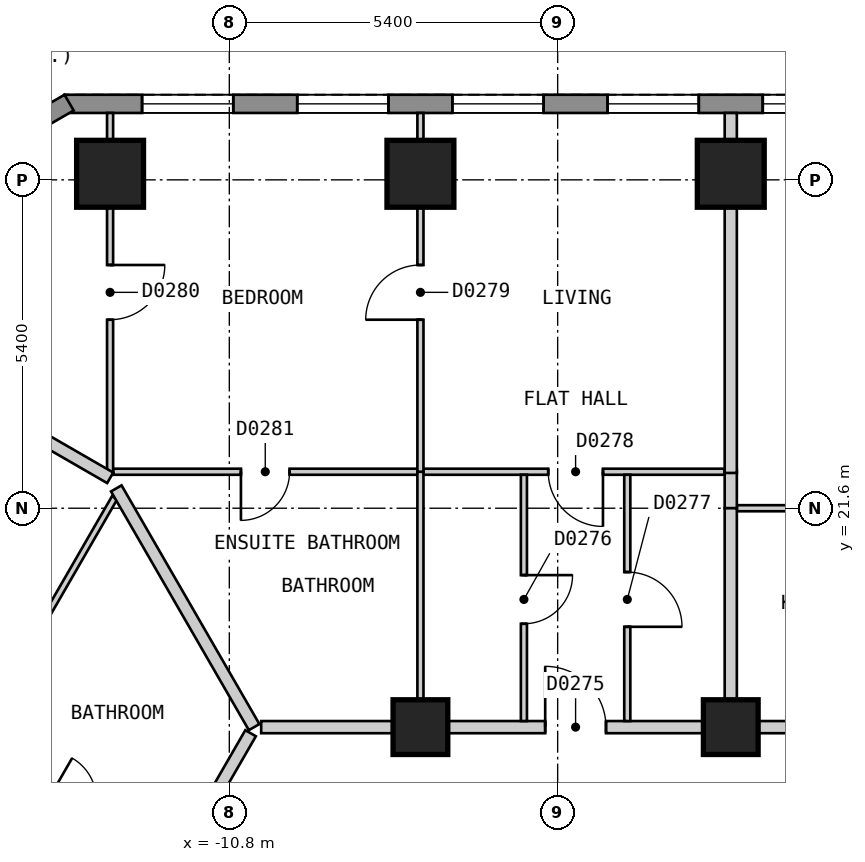
"""IFC4 building model, lengths in metres.
Left out: names, types, materials, properties, quantities, classifications, styles, units other than length and angle.
Written with IfcOpenShell. Run it as: python <this file> out.ifc"""

import sys

from ifc_helpers import new_model, si_unit, direction, frame, frame_2d, origin, origin_2d, place, context, subcontext, project, spatial, polyline, rectangle, outline, extrude, element, fill, save


model = new_model("IFC4")
c1 = context("Model", 3, precision=1e-05, world=origin(), true_north=direction((0.0, 1.0)))
c2 = subcontext(c1, "Body", "Model", "MODEL_VIEW")
j1 = project(units=[si_unit("LENGTHUNIT", "METRE"), si_unit("PLANEANGLEUNIT", "RADIAN")], contexts=[c1])
p1 = place(None, origin())
s1 = spatial("IfcSite", under=j1, at=p1, CompositionType="ELEMENT")
p2 = place(p1, origin())
s2 = spatial("IfcBuilding", under=s1, at=p2, CompositionType="ELEMENT")
p3 = place(p2, frame((0.0, 0.0, 41.4)))
s3 = spatial("IfcBuildingStorey", under=s2, at=p3, CompositionType="ELEMENT", Elevation=41.4)
for number, where, z_axis, x_axis in (
    (1, (-2.553, 27.1, 0.0), (0.0, 0.0, 1.0), (-1.0, 0.0, 0.0)),
    (2, (-7.657, 27.1, 0.0), (0.0, 0.0, 1.0), (-1.0, 0.0, 0.0)),
    (3, (-12.761, 27.1, 0.0), (0.0, 0.0, 1.0), (-1.0, 0.0, 0.0)),
):
    element("IfcColumn", number, at=place(p3, frame(where, z_axis=z_axis, x_axis=x_axis)), inside=s3, PredefinedType="COLUMN", context=c2, shape_type="SweptSolid", body=[
        extrude(rectangle(XDim=1.1, YDim=1.1, at=origin_2d()), origin(), (0.0, 0.0, 1.0), 3.0),
    ])
for number, where, z_axis, x_axis in (
    (4, (-2.553, 18.0, 0.0), (0.0, 0.0, 1.0), (-1.0, 0.0, 0.0)),
    (5, (-7.657, 18.0, 0.0), (0.0, 0.0, 1.0), (-1.0, 0.0, 0.0)),
):
    element("IfcColumn", number, at=place(p3, frame(where, z_axis=z_axis, x_axis=x_axis)), inside=s3, PredefinedType="COLUMN", context=c2, shape_type="SweptSolid", body=[
        extrude(rectangle(XDim=0.9, YDim=0.9, at=origin_2d()), origin(), (0.0, 0.0, 1.0), 3.0),
    ])
p4 = place(p3, frame((13.51, 28.25, 0.0), z_axis=(0.0, 0.0, 1.0), x_axis=(-1.0, 0.0, 0.0)))
e6 = element("IfcWall", 6, at=p4, inside=s3, PredefinedType="SOLIDWALL", context=c2, shape_type="SweptSolid", body=[
    extrude(outline(polyline([(0.0, -0.15), (27.02, -0.15), (26.94, 0.15), (0.08, 0.15), (0.0, -0.15)])), origin(), (0.0, 0.0, 1.0), 2.7),
])
p5 = place(p4, frame((1.277, 0.0, 0.15)))
e7 = element("IfcOpeningElement", 7, at=p5, cuts=e6, PredefinedType="OPENING", context=c2, shape_type="SweptSolid", body=[
    extrude(rectangle(XDim=1.5, YDim=2.1, at=frame_2d((0.75, 1.05))), frame((0.0, 0.16, 0.0), z_axis=(0.0, -1.0, 0.0), x_axis=(1.0, 0.0, 0.0)), (0.0, 0.0, 1.0), 0.32),
])
p6 = place(p4, frame((3.829, 0.0, 0.15)))
e8 = element("IfcOpeningElement", 8, at=p6, cuts=e6, PredefinedType="OPENING", context=c2, shape_type="SweptSolid", body=[
    extrude(rectangle(XDim=1.5, YDim=2.1, at=frame_2d((0.75, 1.05))), frame((0.0, 0.16, 0.0), z_axis=(0.0, -1.0, 0.0), x_axis=(1.0, 0.0, 0.0)), (0.0, 0.0, 1.0), 0.32),
])
p7 = place(p4, frame((6.381, 0.0, 0.15)))
e9 = element("IfcOpeningElement", 9, at=p7, cuts=e6, PredefinedType="OPENING", context=c2, shape_type="SweptSolid", body=[
    extrude(rectangle(XDim=1.5, YDim=2.1, at=frame_2d((0.75, 1.05))), frame((0.0, 0.16, 0.0), z_axis=(0.0, -1.0, 0.0), x_axis=(1.0, 0.0, 0.0)), (0.0, 0.0, 1.0), 0.32),
])
p8 = place(p4, frame((8.933, 0.0, 0.15)))
e10 = element("IfcOpeningElement", 10, at=p8, cuts=e6, PredefinedType="OPENING", context=c2, shape_type="SweptSolid", body=[
    extrude(rectangle(XDim=1.5, YDim=2.1, at=frame_2d((0.75, 1.05))), frame((0.0, 0.16, 0.0), z_axis=(0.0, -1.0, 0.0), x_axis=(1.0, 0.0, 0.0)), (0.0, 0.0, 1.0), 0.32),
])
p9 = place(p4, frame((11.485, 0.0, 0.15)))
e11 = element("IfcOpeningElement", 11, at=p9, cuts=e6, PredefinedType="OPENING", context=c2, shape_type="SweptSolid", body=[
    extrude(rectangle(XDim=1.5, YDim=2.1, at=frame_2d((0.75, 1.05))), frame((0.0, 0.16, 0.0), z_axis=(0.0, -1.0, 0.0), x_axis=(1.0, 0.0, 0.0)), (0.0, 0.0, 1.0), 0.32),
])
p10 = place(p4, frame((14.037, 0.0, 0.15)))
e12 = element("IfcOpeningElement", 12, at=p10, cuts=e6, PredefinedType="OPENING", context=c2, shape_type="SweptSolid", body=[
    extrude(rectangle(XDim=1.5, YDim=2.1, at=frame_2d((0.75, 1.05))), frame((0.0, 0.16, 0.0), z_axis=(0.0, -1.0, 0.0), x_axis=(1.0, 0.0, 0.0)), (0.0, 0.0, 1.0), 0.32),
])
p11 = place(p4, frame((16.589, 0.0, 0.15)))
e13 = element("IfcOpeningElement", 13, at=p11, cuts=e6, PredefinedType="OPENING", context=c2, shape_type="SweptSolid", body=[
    extrude(rectangle(XDim=1.5, YDim=2.1, at=frame_2d((0.75, 1.05))), frame((0.0, 0.16, 0.0), z_axis=(0.0, -1.0, 0.0), x_axis=(1.0, 0.0, 0.0)), (0.0, 0.0, 1.0), 0.32),
])
p12 = place(p4, frame((19.141, 0.0, 0.15)))
e14 = element("IfcOpeningElement", 14, at=p12, cuts=e6, PredefinedType="OPENING", context=c2, shape_type="SweptSolid", body=[
    extrude(rectangle(XDim=1.5, YDim=2.1, at=frame_2d((0.75, 1.05))), frame((0.0, 0.16, 0.0), z_axis=(0.0, -1.0, 0.0), x_axis=(1.0, 0.0, 0.0)), (0.0, 0.0, 1.0), 0.32),
])
p13 = place(p4, frame((21.693, 0.0, 0.15)))
e15 = element("IfcOpeningElement", 15, at=p13, cuts=e6, PredefinedType="OPENING", context=c2, shape_type="SweptSolid", body=[
    extrude(rectangle(XDim=1.5, YDim=2.1, at=frame_2d((0.75, 1.05))), frame((0.0, 0.16, 0.0), z_axis=(0.0, -1.0, 0.0), x_axis=(1.0, 0.0, 0.0)), (0.0, 0.0, 1.0), 0.32),
])
p14 = place(p4, frame((24.245, 0.0, 0.15)))
e16 = element("IfcOpeningElement", 16, at=p14, cuts=e6, PredefinedType="OPENING", context=c2, shape_type="SweptSolid", body=[
    extrude(rectangle(XDim=1.5, YDim=2.1, at=frame_2d((0.75, 1.05))), frame((0.0, 0.16, 0.0), z_axis=(0.0, -1.0, 0.0), x_axis=(1.0, 0.0, 0.0)), (0.0, 0.0, 1.0), 0.32),
])
p15 = place(p3, frame((-13.435, 28.27, 0.0), z_axis=(0.0, 0.0, 1.0), x_axis=(-0.866010750942, -0.50002537861, 0.0)))
e17 = element("IfcWall", 17, at=p15, inside=s3, PredefinedType="SOLIDWALL", context=c2, shape_type="SweptSolid", body=[
    extrude(outline(polyline([(0.0, -0.15), (5.0, -0.15), (4.919, 0.15), (0.08, 0.15), (0.0, -0.15)])), origin(), (0.0, 0.0, 1.0), 2.7),
])
p16 = place(p15, frame((0.65, 0.0, 0.15)))
e18 = element("IfcOpeningElement", 18, at=p16, cuts=e17, PredefinedType="OPENING", context=c2, shape_type="SweptSolid", body=[
    extrude(rectangle(XDim=1.2, YDim=2.1, at=frame_2d((0.6, 1.05))), frame((0.0, 0.16, 0.0), z_axis=(0.0, -1.0, 0.0), x_axis=(1.0, 0.0, 0.0)), (0.0, 0.0, 1.0), 0.32),
])
p17 = place(p15, frame((3.149, 0.0, 0.15)))
e19 = element("IfcOpeningElement", 19, at=p17, cuts=e17, PredefinedType="OPENING", context=c2, shape_type="SweptSolid", body=[
    extrude(rectangle(XDim=1.2, YDim=2.1, at=frame_2d((0.6, 1.05))), frame((0.0, 0.16, 0.0), z_axis=(0.0, -1.0, 0.0), x_axis=(1.0, 0.0, 0.0)), (0.0, 0.0, 1.0), 0.32),
])
p18 = place(p3, frame((-10.276, 18.0, 0.0), z_axis=(0.0, 0.0, 1.0), x_axis=(1.0, 0.0, 0.0)))
e20 = element("IfcWall", 20, at=p18, inside=s3, PredefinedType="PARTITIONING", context=c2, shape_type="SweptSolid", body=[
    extrude(rectangle(XDim=20.558, YDim=0.2, at=frame_2d((10.279, 0.0))), origin(), (0.0, 0.0, 1.0), 2.7),
])
p19 = place(p18, frame((19.265, 0.0, 0.0)))
e21 = element("IfcOpeningElement", 21, at=p19, cuts=e20, PredefinedType="OPENING", context=c2, shape_type="SweptSolid", body=[
    extrude(rectangle(XDim=1.0, YDim=2.1, at=frame_2d((0.5, 1.05))), frame((0.0, 0.11, 0.0), z_axis=(0.0, -1.0, 0.0), x_axis=(1.0, 0.0, 0.0)), (0.0, 0.0, 1.0), 0.22),
])
p20 = place(p18, frame((14.879, 0.0, 0.0)))
e22 = element("IfcOpeningElement", 22, at=p20, cuts=e20, PredefinedType="OPENING", context=c2, shape_type="SweptSolid", body=[
    extrude(rectangle(XDim=1.0, YDim=2.1, at=frame_2d((0.5, 1.05))), frame((0.0, 0.11, 0.0), z_axis=(0.0, -1.0, 0.0), x_axis=(1.0, 0.0, 0.0)), (0.0, 0.0, 1.0), 0.22),
])
p21 = place(p18, frame((4.671, 0.0, 0.0)))
e23 = element("IfcOpeningElement", 23, at=p21, cuts=e20, PredefinedType="OPENING", context=c2, shape_type="SweptSolid", body=[
    extrude(rectangle(XDim=1.0, YDim=2.1, at=frame_2d((0.5, 1.05))), frame((0.0, 0.11, 0.0), z_axis=(0.0, -1.0, 0.0), x_axis=(1.0, 0.0, 0.0)), (0.0, 0.0, 1.0), 0.22),
])
p22 = place(p3, frame((-20.727, 0.099, 0.0), z_axis=(0.0, 0.0, 1.0), x_axis=(0.499993204491, 0.866029327138, 0.0)))
e24 = element("IfcWall", 24, at=p22, inside=s3, PredefinedType="PARTITIONING", context=c2, shape_type="SweptSolid", body=[
    extrude(rectangle(XDim=20.554, YDim=0.2, at=frame_2d((10.277, 0.0))), origin(), (0.0, 0.0, 1.0), 2.7),
])
p23 = place(p22, frame((14.88, 0.0, 0.0)))
e25 = element("IfcOpeningElement", 25, at=p23, cuts=e24, PredefinedType="OPENING", context=c2, shape_type="SweptSolid", body=[
    extrude(rectangle(XDim=1.0, YDim=2.1, at=frame_2d((0.5, 1.05))), frame((0.0, 0.11, 0.0), z_axis=(0.0, -1.0, 0.0), x_axis=(1.0, 0.0, 0.0)), (0.0, 0.0, 1.0), 0.22),
])
p24 = place(p22, frame((4.673, 0.0, 0.0)))
e26 = element("IfcOpeningElement", 26, at=p24, cuts=e24, PredefinedType="OPENING", context=c2, shape_type="SweptSolid", body=[
    extrude(rectangle(XDim=1.0, YDim=2.1, at=frame_2d((0.5, 1.05))), frame((0.0, 0.11, 0.0), z_axis=(0.0, -1.0, 0.0), x_axis=(1.0, 0.0, 0.0)), (0.0, 0.0, 1.0), 0.22),
])
p25 = place(p22, frame((0.838, 0.0, 0.0)))
e27 = element("IfcOpeningElement", 27, at=p25, cuts=e24, PredefinedType="OPENING", context=c2, shape_type="SweptSolid", body=[
    extrude(rectangle(XDim=0.8, YDim=2.1, at=frame_2d((0.4, 1.05))), frame((0.0, 0.11, 0.0), z_axis=(0.0, -1.0, 0.0), x_axis=(1.0, 0.0, 0.0)), (0.0, 0.0, 1.0), 0.22),
])
p26 = place(p3, frame((-2.453, 21.6, 0.0), z_axis=(0.0, 0.0, 1.0), x_axis=(1.0, 0.0, 0.0)))
e28 = element("IfcWall", 28, at=p26, inside=s3, PredefinedType="PARTITIONING", context=c2, shape_type="SweptSolid", body=[
    extrude(rectangle(XDim=4.954, YDim=0.1, at=frame_2d((2.477, 0.0))), origin(), (0.0, 0.0, 1.0), 2.7),
])
p27 = place(p26, frame((2.052, 0.0, 0.0)))
e29 = element("IfcOpeningElement", 29, at=p27, cuts=e28, PredefinedType="OPENING", context=c2, shape_type="SweptSolid", body=[
    extrude(rectangle(XDim=0.8, YDim=2.1, at=frame_2d((0.4, 1.05))), frame((0.0, 0.06, 0.0), z_axis=(0.0, -1.0, 0.0), x_axis=(1.0, 0.0, 0.0)), (0.0, 0.0, 1.0), 0.12),
])
p28 = place(p3, frame((-12.711, 22.2, 0.0), z_axis=(0.0, 0.0, 1.0), x_axis=(1.0, 0.0, 0.0)))
e30 = element("IfcWall", 30, at=p28, inside=s3, PredefinedType="PARTITIONING", context=c2, shape_type="SweptSolid", body=[
    extrude(rectangle(XDim=10.058, YDim=0.1, at=frame_2d((5.029, 0.0))), origin(), (0.0, 0.0, 1.0), 2.7),
])
p29 = place(p28, frame((7.156, 0.0, 0.0)))
e31 = element("IfcOpeningElement", 31, at=p29, cuts=e30, PredefinedType="OPENING", context=c2, shape_type="SweptSolid", body=[
    extrude(rectangle(XDim=0.9, YDim=2.1, at=frame_2d((0.45, 1.05))), frame((0.0, 0.06, 0.0), z_axis=(0.0, -1.0, 0.0), x_axis=(1.0, 0.0, 0.0)), (0.0, 0.0, 1.0), 0.12),
])
p30 = place(p28, frame((2.102, 0.0, 0.0)))
e32 = element("IfcOpeningElement", 32, at=p30, cuts=e30, PredefinedType="OPENING", context=c2, shape_type="SweptSolid", body=[
    extrude(rectangle(XDim=0.8, YDim=2.1, at=frame_2d((0.4, 1.05))), frame((0.0, 0.06, 0.0), z_axis=(0.0, -1.0, 0.0), x_axis=(1.0, 0.0, 0.0)), (0.0, 0.0, 1.0), 0.12),
])
p31 = place(p3, frame((-20.169, 8.812, 0.0), z_axis=(0.0, 0.0, 1.0), x_axis=(0.499995459772, 0.86602802507, 0.0)))
e33 = element("IfcWall", 33, at=p31, inside=s3, PredefinedType="PARTITIONING", context=c2, shape_type="SweptSolid", body=[
    extrude(rectangle(XDim=14.966, YDim=0.1, at=frame_2d((7.483, 0.0))), origin(), (0.0, 0.0, 1.0), 2.7),
])
p32 = place(p31, frame((7.105, 0.0, 0.0)))
e34 = element("IfcOpeningElement", 34, at=p32, cuts=e33, PredefinedType="OPENING", context=c2, shape_type="SweptSolid", body=[
    extrude(rectangle(XDim=0.9, YDim=2.1, at=frame_2d((0.45, 1.05))), frame((0.0, 0.06, 0.0), z_axis=(0.0, -1.0, 0.0), x_axis=(1.0, 0.0, 0.0)), (0.0, 0.0, 1.0), 0.12),
])
p33 = place(p3, frame((-4.255, 18.1, 0.0), z_axis=(0.0, 0.0, 1.0), x_axis=(0.0, 1.0, 0.0)))
e35 = element("IfcWall", 35, at=p33, inside=s3, PredefinedType="PARTITIONING", context=c2, shape_type="SweptSolid", body=[
    extrude(rectangle(XDim=4.05, YDim=0.1, at=frame_2d((2.025, 0.0))), origin(), (0.0, 0.0, 1.0), 2.7),
])
p34 = place(p33, frame((1.55, 0.0, 0.0)))
e36 = element("IfcOpeningElement", 36, at=p34, cuts=e35, PredefinedType="OPENING", context=c2, shape_type="SweptSolid", body=[
    extrude(rectangle(XDim=0.9, YDim=2.1, at=frame_2d((0.45, 1.05))), frame((0.0, 0.06, 0.0), z_axis=(0.0, -1.0, 0.0), x_axis=(1.0, 0.0, 0.0)), (0.0, 0.0, 1.0), 0.12),
])
p35 = place(p3, frame((-5.955, 18.1, 0.0), z_axis=(0.0, 0.0, 1.0), x_axis=(0.0, 1.0, 0.0)))
e37 = element("IfcWall", 37, at=p35, inside=s3, PredefinedType="PARTITIONING", context=c2, shape_type="SweptSolid", body=[
    extrude(rectangle(XDim=4.05, YDim=0.1, at=frame_2d((2.025, 0.0))), origin(), (0.0, 0.0, 1.0), 2.7),
])
p36 = place(p35, frame((1.6, 0.0, 0.0)))
e38 = element("IfcOpeningElement", 38, at=p36, cuts=e37, PredefinedType="OPENING", context=c2, shape_type="SweptSolid", body=[
    extrude(rectangle(XDim=0.8, YDim=2.1, at=frame_2d((0.4, 1.05))), frame((0.0, 0.06, 0.0), z_axis=(0.0, -1.0, 0.0), x_axis=(1.0, 0.0, 0.0)), (0.0, 0.0, 1.0), 0.12),
])
p37 = place(p3, frame((-7.657, 18.1, 0.0), z_axis=(0.0, 0.0, 1.0), x_axis=(0.0, 1.0, 0.0)))
e39 = element("IfcWall", 39, at=p37, inside=s3, PredefinedType="PARTITIONING", context=c2, shape_type="SweptSolid", body=[
    extrude(rectangle(XDim=4.1, YDim=0.1, at=frame_2d((2.05, 0.0))), origin(), (0.0, 0.0, 1.0), 2.7),
])
p38 = place(p3, frame((-12.761, 22.2, 0.0), z_axis=(0.0, 0.0, 1.0), x_axis=(0.0, 1.0, 0.0)))
e40 = element("IfcWall", 40, at=p38, inside=s3, PredefinedType="PARTITIONING", context=c2, shape_type="SweptSolid", body=[
    extrude(rectangle(XDim=5.9, YDim=0.1, at=frame_2d((2.95, 0.0))), origin(), (0.0, 0.0, 1.0), 2.7),
])
p39 = place(p38, frame((2.5, 0.0, 0.0)))
e41 = element("IfcOpeningElement", 41, at=p39, cuts=e40, PredefinedType="OPENING", context=c2, shape_type="SweptSolid", body=[
    extrude(rectangle(XDim=0.9, YDim=2.1, at=frame_2d((0.45, 1.05))), frame((0.0, 0.06, 0.0), z_axis=(0.0, -1.0, 0.0), x_axis=(1.0, 0.0, 0.0)), (0.0, 0.0, 1.0), 0.12),
])
p40 = place(p3, frame((-12.659, 21.926, 0.0), z_axis=(0.0, 0.0, 1.0), x_axis=(0.500025458316, -0.86601070492, 0.0)))
e42 = element("IfcWall", 42, at=p40, inside=s3, PredefinedType="PARTITIONING", context=c2, shape_type="SweptSolid", body=[
    extrude(rectangle(XDim=4.533, YDim=0.2, at=frame_2d((2.267, 0.0))), origin(), (0.0, 0.0, 1.0), 2.7),
])
p41 = place(p3, frame((-2.553, 22.22, 0.0), z_axis=(0.0, 0.0, 1.0), x_axis=(0.0, -1.0, 0.0)))
e43 = element("IfcWall", 43, at=p41, inside=s3, PredefinedType="PARTITIONING", context=c2, shape_type="SweptSolid", body=[
    extrude(rectangle(XDim=0.62, YDim=0.2, at=frame_2d((0.31, 0.0))), origin(), (0.0, 0.0, 1.0), 2.7),
])
p42 = place(p3, frame((-17.955, 25.099, 0.0), z_axis=(0.0, 0.0, 1.0), x_axis=(0.86609140076, -0.499885672459, 0.0)))
e44 = element("IfcWall", 44, at=p42, inside=s3, PredefinedType="PARTITIONING", context=c2, shape_type="SweptSolid", body=[
    extrude(rectangle(XDim=6.0, YDim=0.2, at=frame_2d((3.0, 0.0))), origin(), (0.0, 0.0, 1.0), 2.7),
])
p43 = place(p3, frame((-2.553, 18.1, 0.0), z_axis=(0.0, 0.0, 1.0), x_axis=(0.0, 1.0, 0.0)))
e45 = element("IfcWall", 45, at=p43, inside=s3, PredefinedType="PARTITIONING", context=c2, shape_type="SweptSolid", body=[
    extrude(rectangle(XDim=3.5, YDim=0.2, at=frame_2d((1.75, 0.0))), origin(), (0.0, 0.0, 1.0), 2.7),
])
p44 = place(p3, frame((-2.553, 22.18, 0.0), z_axis=(0.0, 0.0, 1.0), x_axis=(0.0, 1.0, 0.0)))
e46 = element("IfcWall", 46, at=p44, inside=s3, PredefinedType="PARTITIONING", context=c2, shape_type="SweptSolid", body=[
    extrude(rectangle(XDim=5.92, YDim=0.2, at=frame_2d((2.96, 0.0))), origin(), (0.0, 0.0, 1.0), 2.7),
])
p45 = place(p3, frame((-15.115, 17.566, 0.0), z_axis=(0.0, 0.0, 1.0), x_axis=(0.866008894869, -0.50002859319, 0.0)))
e47 = element("IfcWall", 47, at=p45, inside=s3, PredefinedType="PARTITIONING", context=c2, shape_type="SweptSolid", body=[
    extrude(rectangle(XDim=3.774, YDim=0.1, at=frame_2d((1.887, 0.0))), origin(), (0.0, 0.0, 1.0), 2.7),
])
p46 = place(p45, frame((1.536, 0.0, 0.0)))
e48 = element("IfcOpeningElement", 48, at=p46, cuts=e47, PredefinedType="OPENING", context=c2, shape_type="SweptSolid", body=[
    extrude(rectangle(XDim=0.8, YDim=2.1, at=frame_2d((0.4, 1.05))), frame((0.0, 0.06, 0.0), z_axis=(0.0, -1.0, 0.0), x_axis=(1.0, 0.0, 0.0)), (0.0, 0.0, 1.0), 0.12),
])
p47 = place(p3, frame((-7.657, 22.2, 0.0), z_axis=(0.0, 0.0, 1.0), x_axis=(0.0, 1.0, 0.0)))
e49 = element("IfcWall", 49, at=p47, inside=s3, PredefinedType="PARTITIONING", context=c2, shape_type="SweptSolid", body=[
    extrude(rectangle(XDim=5.9, YDim=0.1, at=frame_2d((2.95, 0.0))), origin(), (0.0, 0.0, 1.0), 2.7),
])
p48 = place(p47, frame((2.5, 0.0, 0.0)))
e50 = element("IfcOpeningElement", 50, at=p48, cuts=e49, PredefinedType="OPENING", context=c2, shape_type="SweptSolid", body=[
    extrude(rectangle(XDim=0.9, YDim=2.1, at=frame_2d((0.45, 1.05))), frame((0.0, 0.06, 0.0), z_axis=(0.0, -1.0, 0.0), x_axis=(1.0, 0.0, 0.0)), (0.0, 0.0, 1.0), 0.12),
])
p49 = place(p10, origin())
e51 = element("IfcWindow", 51, at=p49, inside=s3, PartitioningType="SINGLE_PANEL", PredefinedType="WINDOW", context=c2, shape_type="SweptSolid", body=[
    extrude(rectangle(XDim=1.5, YDim=2.1, at=frame_2d((0.75, 1.05))), frame((0.0, 0.03, 0.0), z_axis=(0.0, -1.0, 0.0), x_axis=(1.0, 0.0, 0.0)), (0.0, 0.0, 1.0), 0.06),
])
fill(e12, e51)
p50 = place(p11, origin())
e52 = element("IfcWindow", 52, at=p50, inside=s3, PartitioningType="SINGLE_PANEL", PredefinedType="WINDOW", context=c2, shape_type="SweptSolid", body=[
    extrude(rectangle(XDim=1.5, YDim=2.1, at=frame_2d((0.75, 1.05))), frame((0.0, 0.03, 0.0), z_axis=(0.0, -1.0, 0.0), x_axis=(1.0, 0.0, 0.0)), (0.0, 0.0, 1.0), 0.06),
])
fill(e13, e52)
p51 = place(p12, origin())
e53 = element("IfcWindow", 53, at=p51, inside=s3, PartitioningType="SINGLE_PANEL", PredefinedType="WINDOW", context=c2, shape_type="SweptSolid", body=[
    extrude(rectangle(XDim=1.5, YDim=2.1, at=frame_2d((0.75, 1.05))), frame((0.0, 0.03, 0.0), z_axis=(0.0, -1.0, 0.0), x_axis=(1.0, 0.0, 0.0)), (0.0, 0.0, 1.0), 0.06),
])
fill(e14, e53)
p52 = place(p13, origin())
e54 = element("IfcWindow", 54, at=p52, inside=s3, PartitioningType="SINGLE_PANEL", PredefinedType="WINDOW", context=c2, shape_type="SweptSolid", body=[
    extrude(rectangle(XDim=1.5, YDim=2.1, at=frame_2d((0.75, 1.05))), frame((0.0, 0.03, 0.0), z_axis=(0.0, -1.0, 0.0), x_axis=(1.0, 0.0, 0.0)), (0.0, 0.0, 1.0), 0.06),
])
fill(e15, e54)
p53 = place(p14, origin())
e55 = element("IfcWindow", 55, at=p53, inside=s3, PartitioningType="SINGLE_PANEL", PredefinedType="WINDOW", context=c2, shape_type="SweptSolid", body=[
    extrude(rectangle(XDim=1.5, YDim=2.1, at=frame_2d((0.75, 1.05))), frame((0.0, 0.03, 0.0), z_axis=(0.0, -1.0, 0.0), x_axis=(1.0, 0.0, 0.0)), (0.0, 0.0, 1.0), 0.06),
])
fill(e16, e55)
p54 = place(p21, origin())
e56 = element("IfcDoor", 56, at=p54, inside=s3, OperationType="SINGLE_SWING_LEFT", PredefinedType="DOOR", context=c2, shape_type="SweptSolid", body=[
    extrude(rectangle(XDim=1.0, YDim=2.1, at=frame_2d((0.5, 1.05))), frame((0.0, 0.025, 0.0), z_axis=(0.0, -1.0, 0.0), x_axis=(1.0, 0.0, 0.0)), (0.0, 0.0, 1.0), 0.05),
])
fill(e23, e56)
p55 = place(p36, origin())
e57 = element("IfcDoor", 57, at=p55, inside=s3, OperationType="SINGLE_SWING_RIGHT", PredefinedType="DOOR", context=c2, shape_type="SweptSolid", body=[
    extrude(rectangle(XDim=0.8, YDim=2.1, at=frame_2d((0.4, 1.05))), frame((0.0, 0.025, 0.0), z_axis=(0.0, -1.0, 0.0), x_axis=(1.0, 0.0, 0.0)), (0.0, 0.0, 1.0), 0.05),
])
fill(e38, e57)
p56 = place(p34, origin())
e58 = element("IfcDoor", 58, at=p56, inside=s3, OperationType="SINGLE_SWING_LEFT", PredefinedType="DOOR", context=c2, shape_type="SweptSolid", body=[
    extrude(rectangle(XDim=0.9, YDim=2.1, at=frame_2d((0.45, 1.05))), frame((0.0, 0.025, 0.0), z_axis=(0.0, -1.0, 0.0), x_axis=(1.0, 0.0, 0.0)), (0.0, 0.0, 1.0), 0.05),
])
fill(e36, e58)
p57 = place(p29, origin())
e59 = element("IfcDoor", 59, at=p57, inside=s3, OperationType="SINGLE_SWING_RIGHT", PredefinedType="DOOR", context=c2, shape_type="SweptSolid", body=[
    extrude(rectangle(XDim=0.9, YDim=2.1, at=frame_2d((0.45, 1.05))), frame((0.0, 0.025, 0.0), z_axis=(0.0, -1.0, 0.0), x_axis=(1.0, 0.0, 0.0)), (0.0, 0.0, 1.0), 0.05),
])
fill(e31, e59)
p58 = place(p48, origin())
e60 = element("IfcDoor", 60, at=p58, inside=s3, OperationType="SINGLE_SWING_LEFT", PredefinedType="DOOR", context=c2, shape_type="SweptSolid", body=[
    extrude(rectangle(XDim=0.9, YDim=2.1, at=frame_2d((0.45, 1.05))), frame((0.0, 0.025, 0.0), z_axis=(0.0, -1.0, 0.0), x_axis=(1.0, 0.0, 0.0)), (0.0, 0.0, 1.0), 0.05),
])
fill(e50, e60)
p59 = place(p39, origin())
e61 = element("IfcDoor", 61, at=p59, inside=s3, OperationType="SINGLE_SWING_RIGHT", PredefinedType="DOOR", context=c2, shape_type="SweptSolid", body=[
    extrude(rectangle(XDim=0.9, YDim=2.1, at=frame_2d((0.45, 1.05))), frame((0.0, 0.025, 0.0), z_axis=(0.0, -1.0, 0.0), x_axis=(1.0, 0.0, 0.0)), (0.0, 0.0, 1.0), 0.05),
])
fill(e41, e61)
p60 = place(p30, origin())
e62 = element("IfcDoor", 62, at=p60, inside=s3, OperationType="SINGLE_SWING_LEFT", PredefinedType="DOOR", context=c2, shape_type="SweptSolid", body=[
    extrude(rectangle(XDim=0.8, YDim=2.1, at=frame_2d((0.4, 1.05))), frame((0.0, 0.025, 0.0), z_axis=(0.0, -1.0, 0.0), x_axis=(1.0, 0.0, 0.0)), (0.0, 0.0, 1.0), 0.05),
])
fill(e32, e62)
save(model, sys.argv[1])
